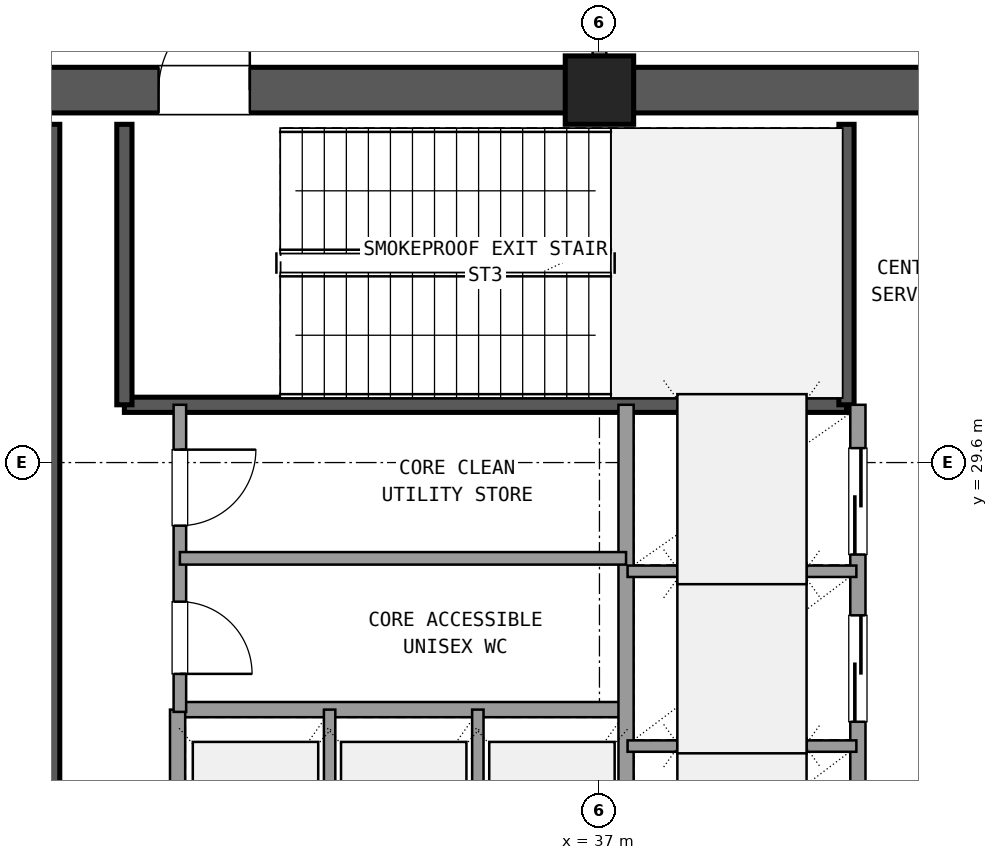
"""IFC4 building model, lengths in metres.
Left out: names, types, materials, properties, quantities, classifications, styles, units other than length and angle.
Written with IfcOpenShell. Run it as: python <this file> out.ifc"""

import sys

from ifc_helpers import new_model, si_unit, direction, frame, frame_2d, origin, origin_2d, place, context, subcontext, project, spatial, rectangle, extrude, element, fill, save


model = new_model("IFC4")
c1 = context("Model", 3, precision=1e-05, world=origin(), true_north=direction((0.0, 1.0)))
c2 = subcontext(c1, "Body", "Model", "MODEL_VIEW")
j1 = project(units=[si_unit("LENGTHUNIT", "METRE"), si_unit("PLANEANGLEUNIT", "RADIAN")], contexts=[c1])
p1 = place(None, origin())
s1 = spatial("IfcSite", under=j1, at=p1, CompositionType="ELEMENT")
p2 = place(p1, origin())
s2 = spatial("IfcBuilding", under=s1, at=p2, CompositionType="ELEMENT")
p3 = place(p2, frame((0.0, 0.0, 237.06)))
s3 = spatial("IfcBuildingStorey", under=s2, at=p3, CompositionType="ELEMENT", Elevation=237.06)
p4 = place(p3, frame((37.0, 34.5, 0.0), z_axis=(0.0, 0.0, 1.0), x_axis=(1.0, 0.0, 0.0)))
e1 = element("IfcColumn", 1, at=p4, inside=s3, PredefinedType="COLUMN", context=c2, shape_type="SweptSolid", body=[
    extrude(rectangle(XDim=0.9, YDim=0.9, at=origin_2d()), origin(), (0.0, 0.0, 1.0), 5.76),
])
p5 = place(p3, frame((47.755, 34.5, 0.0), z_axis=(0.0, 0.0, 1.0), x_axis=(-1.0, 0.0, 0.0)))
e2 = element("IfcWall", 2, at=p5, inside=s3, PredefinedType="SHEAR", context=c2, shape_type="SweptSolid", body=[
    extrude(rectangle(XDim=10.31, YDim=0.6, at=frame_2d((5.155, 0.0))), origin(), (0.0, 0.0, 1.0), 5.48),
])
p6 = place(p5, frame((4.655, 0.0, 0.0)))
e3 = element("IfcOpeningElement", 3, at=p6, cuts=e2, PredefinedType="OPENING", context=c2, shape_type="SweptSolid", body=[
    extrude(rectangle(XDim=1.6, YDim=2.2, at=frame_2d((0.8, 1.1))), frame((0.0, 0.31, 0.0), z_axis=(0.0, -1.0, 0.0), x_axis=(1.0, 0.0, 0.0)), (0.0, 0.0, 1.0), 0.62),
])
p7 = place(p3, frame((36.555, 34.5, 0.0), z_axis=(0.0, 0.0, 1.0), x_axis=(-1.0, 0.0, 0.0)))
e4 = element("IfcWall", 4, at=p7, inside=s3, PredefinedType="SHEAR", context=c2, shape_type="SweptSolid", body=[
    extrude(rectangle(XDim=10.31, YDim=0.6, at=frame_2d((5.155, 0.0))), origin(), (0.0, 0.0, 1.0), 5.48),
])
p8 = place(p7, frame((4.155, 0.0, 0.0)))
e5 = element("IfcOpeningElement", 5, at=p8, cuts=e4, PredefinedType="OPENING", context=c2, shape_type="SweptSolid", body=[
    extrude(rectangle(XDim=1.2, YDim=2.15, at=frame_2d((0.6, 1.075))), frame((0.0, 0.31, 0.0), z_axis=(0.0, -1.0, 0.0), x_axis=(1.0, 0.0, 0.0)), (0.0, 0.0, 1.0), 0.62),
])
p9 = place(p3, frame((29.8, 24.65, 0.0), z_axis=(0.0, 0.0, 1.0), x_axis=(0.0, 1.0, 0.0)))
e6 = element("IfcWall", 6, at=p9, inside=s3, PredefinedType="SHEAR", context=c2, shape_type="SweptSolid", body=[
    extrude(rectangle(XDim=9.4, YDim=0.2, at=frame_2d((4.7, 0.0))), origin(), (0.0, 0.0, 1.0), 5.48),
])
p10 = place(p3, frame((30.75, 30.36, 0.0), z_axis=(0.0, 0.0, 1.0), x_axis=(1.0, 0.0, 0.0)))
e7 = element("IfcWall", 7, at=p10, inside=s3, PredefinedType="SHEAR", context=c2, shape_type="SweptSolid", body=[
    extrude(rectangle(XDim=9.5, YDim=0.2, at=frame_2d((4.75, 0.0))), origin(), (0.0, 0.0, 1.0), 5.48),
])
for number, where, z_axis, x_axis in (
    (8, (30.75, 30.36, 0.0), (0.0, 0.0, 1.0), (0.0, 1.0, 0.0)),
    (9, (40.25, 30.36, 0.0), (0.0, 0.0, 1.0), (0.0, 1.0, 0.0)),
):
    element("IfcWall", number, at=place(p3, frame(where, z_axis=z_axis, x_axis=x_axis)), inside=s3, PredefinedType="SHEAR", context=c2, shape_type="SweptSolid", body=[
        extrude(rectangle(XDim=3.69, YDim=0.2, at=frame_2d((1.845, 0.0))), origin(), (0.0, 0.0, 1.0), 5.48),
    ])
p11 = place(p3, frame((31.45, 26.35, 0.0), z_axis=(0.0, 0.0, 1.0), x_axis=(1.0, 0.0, 0.0)))
e10 = element("IfcWall", 10, at=p11, inside=s3, PredefinedType="SOLIDWALL", context=c2, shape_type="SweptSolid", body=[
    extrude(rectangle(XDim=5.9, YDim=0.2, at=frame_2d((2.95, 0.0))), origin(), (0.0, 0.0, 1.0), 4.77),
])
p12 = place(p3, frame((31.45, 23.54, 0.0), z_axis=(0.0, 0.0, 1.0), x_axis=(0.0, 1.0, 0.0)))
e11 = element("IfcWall", 11, at=p12, inside=s3, PredefinedType="SOLIDWALL", context=c2, shape_type="SweptSolid", body=[
    extrude(rectangle(XDim=2.81, YDim=0.2, at=frame_2d((1.405, 0.0))), origin(), (0.0, 0.0, 1.0), 4.77),
])
for number, where, z_axis, x_axis in (
    (12, (33.45, 23.54, 0.0), (0.0, 0.0, 1.0), (0.0, 1.0, 0.0)),
    (13, (35.4, 23.54, 0.0), (0.0, 0.0, 1.0), (0.0, 1.0, 0.0)),
):
    element("IfcWall", number, at=place(p3, frame(where, z_axis=z_axis, x_axis=x_axis)), inside=s3, PredefinedType="PARTITIONING", context=c2, shape_type="SweptSolid", body=[
        extrude(rectangle(XDim=2.81, YDim=0.15, at=frame_2d((1.405, 0.0))), origin(), (0.0, 0.0, 1.0), 4.77),
    ])
p13 = place(p3, frame((37.35, 23.54, 0.0), z_axis=(0.0, 0.0, 1.0), x_axis=(0.0, 1.0, 0.0)))
e14 = element("IfcWall", 14, at=p13, inside=s3, PredefinedType="SOLIDWALL", context=c2, shape_type="SweptSolid", body=[
    extrude(rectangle(XDim=6.82, YDim=0.2, at=frame_2d((3.41, 0.0))), origin(), (0.0, 0.0, 1.0), 4.77),
])
p14 = place(p3, frame((40.4, 23.54, 0.0), z_axis=(0.0, 0.0, 1.0), x_axis=(0.0, 1.0, 0.0)))
e15 = element("IfcWall", 15, at=p14, inside=s3, PredefinedType="SOLIDWALL", context=c2, shape_type="SweptSolid", body=[
    extrude(rectangle(XDim=6.82, YDim=0.2, at=frame_2d((3.41, 0.0))), origin(), (0.0, 0.0, 1.0), 4.77),
])
p15 = place(p14, frame((0.35, 0.0, 0.0)))
e16 = element("IfcOpeningElement", 16, at=p15, cuts=e15, PredefinedType="OPENING", context=c2, shape_type="SweptSolid", body=[
    extrude(rectangle(XDim=1.4, YDim=2.2, at=frame_2d((0.7, 1.1))), frame((0.0, 0.11, 0.0), z_axis=(0.0, -1.0, 0.0), x_axis=(1.0, 0.0, 0.0)), (0.0, 0.0, 1.0), 0.22),
])
p16 = place(p14, frame((2.65, 0.0, 0.0)))
e17 = element("IfcOpeningElement", 17, at=p16, cuts=e15, PredefinedType="OPENING", context=c2, shape_type="SweptSolid", body=[
    extrude(rectangle(XDim=1.4, YDim=2.2, at=frame_2d((0.7, 1.1))), frame((0.0, 0.11, 0.0), z_axis=(0.0, -1.0, 0.0), x_axis=(1.0, 0.0, 0.0)), (0.0, 0.0, 1.0), 0.22),
])
p17 = place(p14, frame((4.85, 0.0, 0.0)))
e18 = element("IfcOpeningElement", 18, at=p17, cuts=e15, PredefinedType="OPENING", context=c2, shape_type="SweptSolid", body=[
    extrude(rectangle(XDim=1.4, YDim=2.2, at=frame_2d((0.7, 1.1))), frame((0.0, 0.11, 0.0), z_axis=(0.0, -1.0, 0.0), x_axis=(1.0, 0.0, 0.0)), (0.0, 0.0, 1.0), 0.22),
])
for number, where, z_axis, x_axis in (
    (19, (37.37, 25.87, 0.0), (0.0, 0.0, 1.0), (1.0, 0.0, 0.0)),
    (20, (37.37, 28.17, 0.0), (0.0, 0.0, 1.0), (1.0, 0.0, 0.0)),
):
    element("IfcWall", number, at=place(p3, frame(where, z_axis=z_axis, x_axis=x_axis)), inside=s3, PredefinedType="PARTITIONING", context=c2, shape_type="SweptSolid", body=[
        extrude(rectangle(XDim=3.01, YDim=0.15, at=frame_2d((1.505, 0.0))), origin(), (0.0, 0.0, 1.0), 4.77),
    ])
p18 = place(p3, frame((31.48, 26.32, 0.0), z_axis=(0.0, 0.0, 1.0), x_axis=(0.0, 1.0, 0.0)))
e21 = element("IfcWall", 21, at=p18, inside=s3, PredefinedType="PLUMBINGWALL", context=c2, shape_type="SweptSolid", body=[
    extrude(rectangle(XDim=4.04, YDim=0.165, at=frame_2d((2.02, 0.0))), origin(), (0.0, 0.0, 1.0), 4.77),
])
p19 = place(p18, frame((0.5, 0.0, 0.0)))
e22 = element("IfcOpeningElement", 22, at=p19, cuts=e21, PredefinedType="OPENING", context=c2, shape_type="SweptSolid", body=[
    extrude(rectangle(XDim=0.95, YDim=2.1, at=frame_2d((0.475, 1.05))), frame((0.0, 0.093, 0.0), z_axis=(0.0, -1.0, 0.0), x_axis=(1.0, 0.0, 0.0)), (0.0, 0.0, 1.0), 0.185),
])
p20 = place(p18, frame((2.45, 0.0, 0.0)))
e23 = element("IfcOpeningElement", 23, at=p20, cuts=e21, PredefinedType="OPENING", context=c2, shape_type="SweptSolid", body=[
    extrude(rectangle(XDim=1.0, YDim=2.15, at=frame_2d((0.5, 1.075))), frame((0.0, 0.093, 0.0), z_axis=(0.0, -1.0, 0.0), x_axis=(1.0, 0.0, 0.0)), (0.0, 0.0, 1.0), 0.185),
])
p21 = place(p3, frame((31.48, 28.34, 0.0), z_axis=(0.0, 0.0, 1.0), x_axis=(1.0, 0.0, 0.0)))
e24 = element("IfcWall", 24, at=p21, inside=s3, PredefinedType="PLUMBINGWALL", context=c2, shape_type="SweptSolid", body=[
    extrude(rectangle(XDim=5.87, YDim=0.165, at=frame_2d((2.935, 0.0))), origin(), (0.0, 0.0, 1.0), 4.77),
])
p22 = place(p3, frame((37.0, 34.95, 0.0), z_axis=(0.0, 0.0, 1.0), x_axis=(0.0, 1.0, 0.0)))
e25 = element("IfcWall", 25, at=p22, inside=s3, PredefinedType="PARTITIONING", context=c2, shape_type="SweptSolid", body=[
    extrude(rectangle(XDim=2.56, YDim=0.18, at=frame_2d((1.28, 0.0))), origin(), (0.0, 0.0, 1.0), 4.77),
])
p23 = place(p22, frame((0.28, 0.0, 0.0)))
e26 = element("IfcOpeningElement", 26, at=p23, cuts=e25, PredefinedType="OPENING", context=c2, shape_type="SweptSolid", body=[
    extrude(rectangle(XDim=2.0, YDim=2.2, at=frame_2d((1.0, 1.1))), frame((0.0, 0.1, 0.0), z_axis=(0.0, -1.0, 0.0), x_axis=(1.0, 0.0, 0.0)), (0.0, 0.0, 1.0), 0.2),
])
p24 = place(p8, frame((1.2, 0.0, 0.0), z_axis=(0.0, 0.0, 1.0), x_axis=(-1.0, 0.0, 0.0)))
e27 = element("IfcDoor", 27, at=p24, inside=s3, OperationType="SINGLE_SWING_LEFT", PredefinedType="DOOR", context=c2, shape_type="SweptSolid", body=[
    extrude(rectangle(XDim=1.2, YDim=2.15, at=frame_2d((0.6, 1.075))), frame((0.0, 0.025, 0.0), z_axis=(0.0, -1.0, 0.0), x_axis=(1.0, 0.0, 0.0)), (0.0, 0.0, 1.0), 0.05),
])
fill(e5, e27)
p25 = place(p16, origin())
e28 = element("IfcDoor", 28, at=p25, inside=s3, OperationType="SLIDING_TO_LEFT", PredefinedType="DOOR", context=c2, shape_type="SweptSolid", body=[
    extrude(rectangle(XDim=1.4, YDim=2.2, at=frame_2d((0.7, 1.1))), frame((0.0, 0.025, 0.0), z_axis=(0.0, -1.0, 0.0), x_axis=(1.0, 0.0, 0.0)), (0.0, 0.0, 1.0), 0.05),
])
fill(e17, e28)
p26 = place(p17, origin())
e29 = element("IfcDoor", 29, at=p26, inside=s3, OperationType="SLIDING_TO_RIGHT", PredefinedType="DOOR", context=c2, shape_type="SweptSolid", body=[
    extrude(rectangle(XDim=1.4, YDim=2.2, at=frame_2d((0.7, 1.1))), frame((0.0, 0.025, 0.0), z_axis=(0.0, -1.0, 0.0), x_axis=(1.0, 0.0, 0.0)), (0.0, 0.0, 1.0), 0.05),
])
fill(e18, e29)
p27 = place(p19, frame((0.95, 0.0, 0.0), z_axis=(0.0, 0.0, 1.0), x_axis=(-1.0, 0.0, 0.0)))
e30 = element("IfcDoor", 30, at=p27, inside=s3, OperationType="SINGLE_SWING_LEFT", PredefinedType="DOOR", context=c2, shape_type="SweptSolid", body=[
    extrude(rectangle(XDim=0.95, YDim=2.1, at=frame_2d((0.475, 1.05))), frame((0.0, 0.025, 0.0), z_axis=(0.0, -1.0, 0.0), x_axis=(1.0, 0.0, 0.0)), (0.0, 0.0, 1.0), 0.05),
])
fill(e22, e30)
p28 = place(p20, frame((1.0, 0.0, 0.0), z_axis=(0.0, 0.0, 1.0), x_axis=(-1.0, 0.0, 0.0)))
e31 = element("IfcDoor", 31, at=p28, inside=s3, OperationType="SINGLE_SWING_RIGHT", PredefinedType="DOOR", context=c2, shape_type="SweptSolid", body=[
    extrude(rectangle(XDim=1.0, YDim=2.15, at=frame_2d((0.5, 1.075))), frame((0.0, 0.025, 0.0), z_axis=(0.0, -1.0, 0.0), x_axis=(1.0, 0.0, 0.0)), (0.0, 0.0, 1.0), 0.05),
])
fill(e23, e31)
save(model, sys.argv[1])
